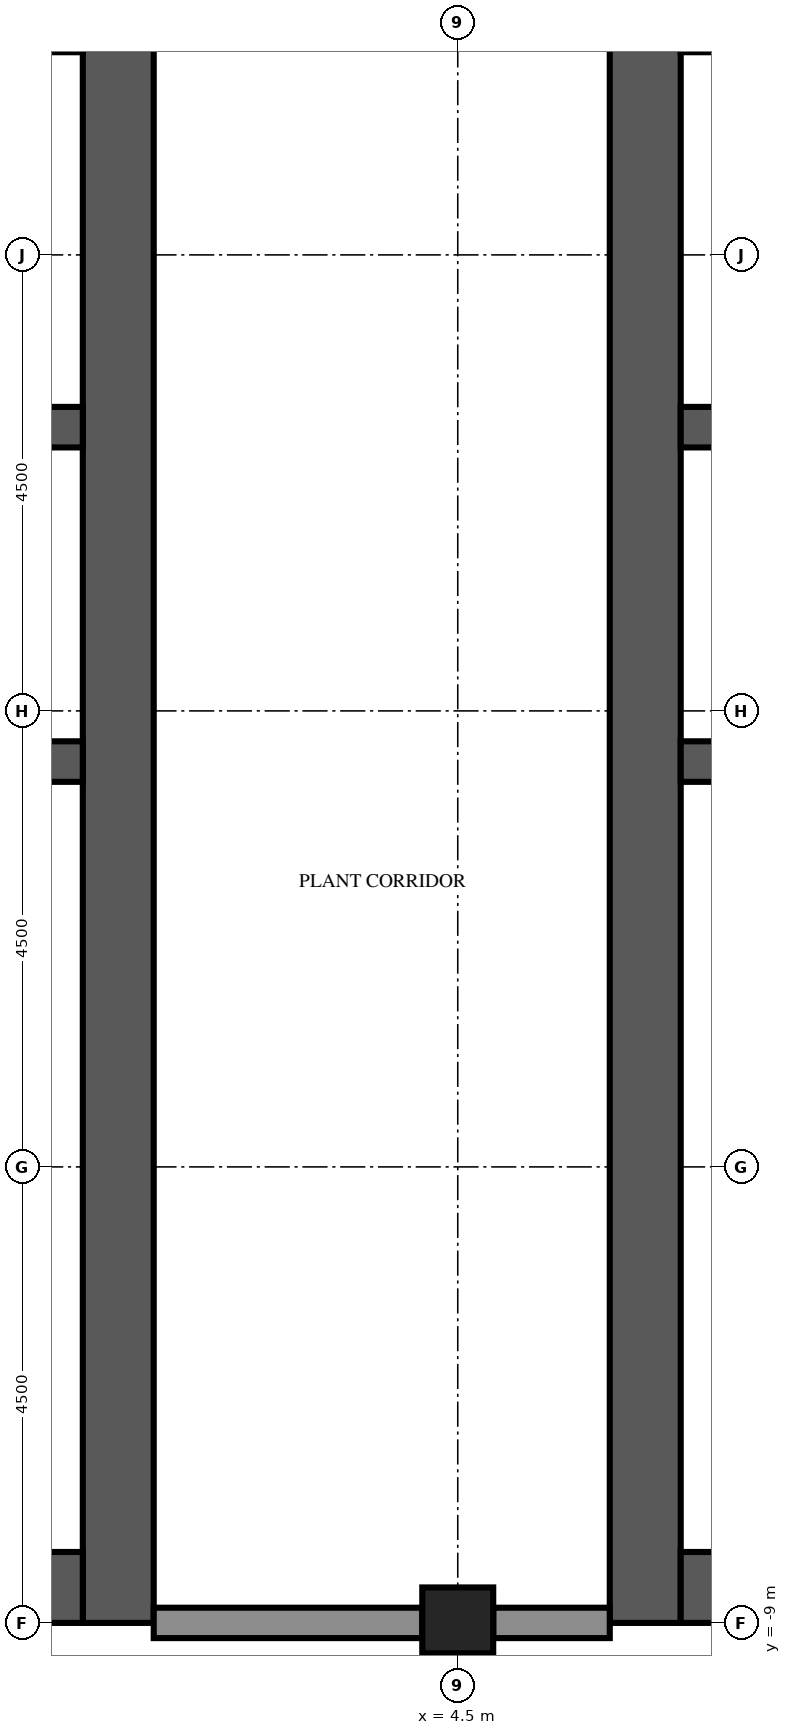
"""IFC4 building model, lengths in metres.
Left out: names, types, materials, properties, quantities, classifications, styles, units other than length and angle.
Written with IfcOpenShell. Run it as: python <this file> out.ifc"""

import sys

from ifc_helpers import new_model, si_unit, direction, frame, frame_2d, origin, origin_2d, place, context, subcontext, project, spatial, rectangle, extrude, element, fill, save


model = new_model("IFC4")
c1 = context("Model", 3, precision=1e-05, world=origin(), true_north=direction((0.0, 1.0)))
c2 = subcontext(c1, "Body", "Model", "MODEL_VIEW")
j1 = project(units=[si_unit("LENGTHUNIT", "METRE"), si_unit("PLANEANGLEUNIT", "RADIAN")], contexts=[c1])
p1 = place(None, origin())
s1 = spatial("IfcSite", under=j1, at=p1, CompositionType="ELEMENT")
p2 = place(p1, origin())
s2 = spatial("IfcBuilding", under=s1, at=p2, CompositionType="ELEMENT")
p3 = place(p2, frame((0.0, 0.0, 321.4)))
s3 = spatial("IfcBuildingStorey", under=s2, at=p3, CompositionType="ELEMENT", Elevation=321.4)
p4 = place(p3, frame((4.5, -9.0, 0.0), z_axis=(0.0, 0.0, 1.0), x_axis=(1.0, 0.0, 0.0)))
e1 = element("IfcColumn", 1, at=p4, inside=s3, PredefinedType="COLUMN", context=c2, shape_type="SweptSolid", body=[
    extrude(rectangle(XDim=0.7, YDim=0.7, at=origin_2d()), origin(), (0.0, 0.0, 1.0), 4.8),
])
p5 = place(p3, frame((1.15, -9.0, 0.0), z_axis=(0.0, 0.0, 1.0), x_axis=(0.0, 1.0, 0.0)))
e2 = element("IfcWall", 2, at=p5, inside=s3, PredefinedType="SHEAR", context=c2, shape_type="SweptSolid", body=[
    extrude(rectangle(XDim=27.5, YDim=0.7, at=frame_2d((13.75, 0.0))), origin(), (0.0, 0.0, 1.0), 4.8),
])
p6 = place(p5, frame((12.55, 0.0, 0.0)))
e3 = element("IfcOpeningElement", 3, at=p6, cuts=e2, PredefinedType="OPENING", context=c2, shape_type="SweptSolid", body=[
    extrude(rectangle(XDim=2.4, YDim=2.4, at=frame_2d((1.2, 1.2))), frame((0.0, 0.36, 0.0), z_axis=(0.0, -1.0, 0.0), x_axis=(1.0, 0.0, 0.0)), (0.0, 0.0, 1.0), 0.72),
])
p7 = place(p5, frame((5.42, 0.0, 0.0)))
e4 = element("IfcOpeningElement", 4, at=p7, cuts=e2, PredefinedType="OPENING", context=c2, shape_type="SweptSolid", body=[
    extrude(rectangle(XDim=1.2, YDim=2.1, at=frame_2d((0.6, 1.05))), frame((0.0, 0.36, 0.0), z_axis=(0.0, -1.0, 0.0), x_axis=(1.0, 0.0, 0.0)), (0.0, 0.0, 1.0), 0.72),
])
p8 = place(p5, frame((19.46, 0.0, 0.0)))
e5 = element("IfcOpeningElement", 5, at=p8, cuts=e2, PredefinedType="OPENING", context=c2, shape_type="SweptSolid", body=[
    extrude(rectangle(XDim=1.0, YDim=2.1, at=frame_2d((0.5, 1.05))), frame((0.0, 0.36, 0.0), z_axis=(0.0, -1.0, 0.0), x_axis=(1.0, 0.0, 0.0)), (0.0, 0.0, 1.0), 0.72),
])
p9 = place(p5, frame((21.17, 0.0, 0.0)))
e6 = element("IfcOpeningElement", 6, at=p9, cuts=e2, PredefinedType="OPENING", context=c2, shape_type="SweptSolid", body=[
    extrude(rectangle(XDim=1.0, YDim=2.1, at=frame_2d((0.5, 1.05))), frame((0.0, 0.36, 0.0), z_axis=(0.0, -1.0, 0.0), x_axis=(1.0, 0.0, 0.0)), (0.0, 0.0, 1.0), 0.72),
])
p10 = place(p5, frame((23.26, 0.0, 0.0)))
e7 = element("IfcOpeningElement", 7, at=p10, cuts=e2, PredefinedType="OPENING", context=c2, shape_type="SweptSolid", body=[
    extrude(rectangle(XDim=1.0, YDim=2.1, at=frame_2d((0.5, 1.05))), frame((0.0, 0.36, 0.0), z_axis=(0.0, -1.0, 0.0), x_axis=(1.0, 0.0, 0.0)), (0.0, 0.0, 1.0), 0.72),
])
p11 = place(p5, frame((25.35, 0.0, 0.0)))
e8 = element("IfcOpeningElement", 8, at=p11, cuts=e2, PredefinedType="OPENING", context=c2, shape_type="SweptSolid", body=[
    extrude(rectangle(XDim=1.0, YDim=2.1, at=frame_2d((0.5, 1.05))), frame((0.0, 0.36, 0.0), z_axis=(0.0, -1.0, 0.0), x_axis=(1.0, 0.0, 0.0)), (0.0, 0.0, 1.0), 0.72),
])
p12 = place(p3, frame((-9.8, -8.65, 0.0), z_axis=(0.0, 0.0, 1.0), x_axis=(1.0, 0.0, 0.0)))
e9 = element("IfcWall", 9, at=p12, inside=s3, PredefinedType="SHEAR", context=c2, shape_type="SweptSolid", body=[
    extrude(rectangle(XDim=10.6, YDim=0.7, at=frame_2d((5.3, 0.0))), origin(), (0.0, 0.0, 1.0), 4.8),
])
p13 = place(p3, frame((-9.8, -0.5, 0.0), z_axis=(0.0, 0.0, 1.0), x_axis=(1.0, 0.0, 0.0)))
e10 = element("IfcWall", 10, at=p13, inside=s3, PredefinedType="SHEAR", context=c2, shape_type="SweptSolid", body=[
    extrude(rectangle(XDim=10.6, YDim=0.4, at=frame_2d((5.3, 0.0))), origin(), (0.0, 0.0, 1.0), 4.8),
])
p14 = place(p3, frame((-9.8, 2.8, 0.0), z_axis=(0.0, 0.0, 1.0), x_axis=(1.0, 0.0, 0.0)))
e11 = element("IfcWall", 11, at=p14, inside=s3, PredefinedType="SHEAR", context=c2, shape_type="SweptSolid", body=[
    extrude(rectangle(XDim=10.6, YDim=0.4, at=frame_2d((5.3, 0.0))), origin(), (0.0, 0.0, 1.0), 4.8),
])
p15 = place(p14, frame((0.688, 0.0, 0.0)))
e12 = element("IfcOpeningElement", 12, at=p15, cuts=e11, PredefinedType="OPENING", context=c2, shape_type="SweptSolid", body=[
    extrude(rectangle(XDim=1.1, YDim=2.1, at=frame_2d((0.55, 1.05))), frame((0.0, 0.21, 0.0), z_axis=(0.0, -1.0, 0.0), x_axis=(1.0, 0.0, 0.0)), (0.0, 0.0, 1.0), 0.42),
])
p16 = place(p14, frame((3.438, 0.0, 0.0)))
e13 = element("IfcOpeningElement", 13, at=p16, cuts=e11, PredefinedType="OPENING", context=c2, shape_type="SweptSolid", body=[
    extrude(rectangle(XDim=1.1, YDim=2.1, at=frame_2d((0.55, 1.05))), frame((0.0, 0.21, 0.0), z_axis=(0.0, -1.0, 0.0), x_axis=(1.0, 0.0, 0.0)), (0.0, 0.0, 1.0), 0.42),
])
p17 = place(p14, frame((6.113, 0.0, 0.0)))
e14 = element("IfcOpeningElement", 14, at=p17, cuts=e11, PredefinedType="OPENING", context=c2, shape_type="SweptSolid", body=[
    extrude(rectangle(XDim=1.0, YDim=2.1, at=frame_2d((0.5, 1.05))), frame((0.0, 0.21, 0.0), z_axis=(0.0, -1.0, 0.0), x_axis=(1.0, 0.0, 0.0)), (0.0, 0.0, 1.0), 0.42),
])
p18 = place(p14, frame((8.863, 0.0, 0.0)))
e15 = element("IfcOpeningElement", 15, at=p18, cuts=e11, PredefinedType="OPENING", context=c2, shape_type="SweptSolid", body=[
    extrude(rectangle(XDim=1.0, YDim=2.1, at=frame_2d((0.5, 1.05))), frame((0.0, 0.21, 0.0), z_axis=(0.0, -1.0, 0.0), x_axis=(1.0, 0.0, 0.0)), (0.0, 0.0, 1.0), 0.42),
])
p19 = place(p3, frame((6.35, -9.0, 0.0), z_axis=(0.0, 0.0, 1.0), x_axis=(0.0, 1.0, 0.0)))
e16 = element("IfcWall", 16, at=p19, inside=s3, PredefinedType="SHEAR", context=c2, shape_type="SweptSolid", body=[
    extrude(rectangle(XDim=27.5, YDim=0.7, at=frame_2d((13.75, 0.0))), origin(), (0.0, 0.0, 1.0), 4.8),
])
p20 = place(p19, frame((12.55, 0.0, 0.0)))
e17 = element("IfcOpeningElement", 17, at=p20, cuts=e16, PredefinedType="OPENING", context=c2, shape_type="SweptSolid", body=[
    extrude(rectangle(XDim=2.4, YDim=2.4, at=frame_2d((1.2, 1.2))), frame((0.0, 0.36, 0.0), z_axis=(0.0, -1.0, 0.0), x_axis=(1.0, 0.0, 0.0)), (0.0, 0.0, 1.0), 0.72),
])
p21 = place(p19, frame((3.9, 0.0, 0.0)))
e18 = element("IfcOpeningElement", 18, at=p21, cuts=e16, PredefinedType="OPENING", context=c2, shape_type="SweptSolid", body=[
    extrude(rectangle(XDim=1.2, YDim=2.1, at=frame_2d((0.6, 1.05))), frame((0.0, 0.36, 0.0), z_axis=(0.0, -1.0, 0.0), x_axis=(1.0, 0.0, 0.0)), (0.0, 0.0, 1.0), 0.72),
])
p22 = place(p19, frame((22.4, 0.0, 0.0)))
e19 = element("IfcOpeningElement", 19, at=p22, cuts=e16, PredefinedType="OPENING", context=c2, shape_type="SweptSolid", body=[
    extrude(rectangle(XDim=1.2, YDim=2.1, at=frame_2d((0.6, 1.05))), frame((0.0, 0.36, 0.0), z_axis=(0.0, -1.0, 0.0), x_axis=(1.0, 0.0, 0.0)), (0.0, 0.0, 1.0), 0.72),
])
p23 = place(p3, frame((6.7, -8.65, 0.0), z_axis=(0.0, 0.0, 1.0), x_axis=(1.0, 0.0, 0.0)))
e20 = element("IfcWall", 20, at=p23, inside=s3, PredefinedType="SHEAR", context=c2, shape_type="SweptSolid", body=[
    extrude(rectangle(XDim=10.6, YDim=0.7, at=frame_2d((5.3, 0.0))), origin(), (0.0, 0.0, 1.0), 4.8),
])
p24 = place(p3, frame((6.7, -0.5, 0.0), z_axis=(0.0, 0.0, 1.0), x_axis=(1.0, 0.0, 0.0)))
e21 = element("IfcWall", 21, at=p24, inside=s3, PredefinedType="SHEAR", context=c2, shape_type="SweptSolid", body=[
    extrude(rectangle(XDim=10.6, YDim=0.4, at=frame_2d((5.3, 0.0))), origin(), (0.0, 0.0, 1.0), 4.8),
])
p25 = place(p3, frame((6.7, 2.8, 0.0), z_axis=(0.0, 0.0, 1.0), x_axis=(1.0, 0.0, 0.0)))
e22 = element("IfcWall", 22, at=p25, inside=s3, PredefinedType="SHEAR", context=c2, shape_type="SweptSolid", body=[
    extrude(rectangle(XDim=10.6, YDim=0.4, at=frame_2d((5.3, 0.0))), origin(), (0.0, 0.0, 1.0), 4.8),
])
p26 = place(p25, frame((0.688, 0.0, 0.0)))
e23 = element("IfcOpeningElement", 23, at=p26, cuts=e22, PredefinedType="OPENING", context=c2, shape_type="SweptSolid", body=[
    extrude(rectangle(XDim=1.1, YDim=2.1, at=frame_2d((0.55, 1.05))), frame((0.0, 0.21, 0.0), z_axis=(0.0, -1.0, 0.0), x_axis=(1.0, 0.0, 0.0)), (0.0, 0.0, 1.0), 0.42),
])
p27 = place(p25, frame((3.438, 0.0, 0.0)))
e24 = element("IfcOpeningElement", 24, at=p27, cuts=e22, PredefinedType="OPENING", context=c2, shape_type="SweptSolid", body=[
    extrude(rectangle(XDim=1.1, YDim=2.1, at=frame_2d((0.55, 1.05))), frame((0.0, 0.21, 0.0), z_axis=(0.0, -1.0, 0.0), x_axis=(1.0, 0.0, 0.0)), (0.0, 0.0, 1.0), 0.42),
])
p28 = place(p25, frame((6.113, 0.0, 0.0)))
e25 = element("IfcOpeningElement", 25, at=p28, cuts=e22, PredefinedType="OPENING", context=c2, shape_type="SweptSolid", body=[
    extrude(rectangle(XDim=1.0, YDim=2.1, at=frame_2d((0.5, 1.05))), frame((0.0, 0.21, 0.0), z_axis=(0.0, -1.0, 0.0), x_axis=(1.0, 0.0, 0.0)), (0.0, 0.0, 1.0), 0.42),
])
p29 = place(p25, frame((8.863, 0.0, 0.0)))
e26 = element("IfcOpeningElement", 26, at=p29, cuts=e22, PredefinedType="OPENING", context=c2, shape_type="SweptSolid", body=[
    extrude(rectangle(XDim=1.0, YDim=2.1, at=frame_2d((0.5, 1.05))), frame((0.0, 0.21, 0.0), z_axis=(0.0, -1.0, 0.0), x_axis=(1.0, 0.0, 0.0)), (0.0, 0.0, 1.0), 0.42),
])
p30 = place(p3, frame((1.5, -9.0, 0.0), z_axis=(0.0, 0.0, 1.0), x_axis=(1.0, 0.0, 0.0)))
e27 = element("IfcWall", 27, at=p30, inside=s3, PredefinedType="SOLIDWALL", context=c2, shape_type="SweptSolid", body=[
    extrude(rectangle(XDim=2.65, YDim=0.3, at=frame_2d((1.325, 0.0))), origin(), (0.0, 0.0, 1.0), 0.85),
])
p31 = place(p3, frame((4.85, -9.0, 0.0), z_axis=(0.0, 0.0, 1.0), x_axis=(1.0, 0.0, 0.0)))
e28 = element("IfcWall", 28, at=p31, inside=s3, PredefinedType="SOLIDWALL", context=c2, shape_type="SweptSolid", body=[
    extrude(rectangle(XDim=1.15, YDim=0.3, at=frame_2d((0.575, 0.0))), origin(), (0.0, 0.0, 1.0), 0.85),
])
p32 = place(p3, frame((-0.7, -5.26, 0.0), z_axis=(0.0, 0.0, 1.0), x_axis=(1.0, 0.0, 0.0)))
e29 = element("IfcWall", 29, at=p32, inside=s3, PredefinedType="PARTITIONING", context=c2, shape_type="SweptSolid", body=[
    extrude(rectangle(XDim=1.5, YDim=0.1, at=frame_2d((0.75, 0.0))), origin(), (0.0, 0.0, 1.0), 4.2),
])
p33 = place(p32, frame((0.25, 0.0, 0.0)))
e30 = element("IfcOpeningElement", 30, at=p33, cuts=e29, PredefinedType="OPENING", context=c2, shape_type="SweptSolid", body=[
    extrude(rectangle(XDim=1.0, YDim=2.1, at=frame_2d((0.5, 1.05))), frame((0.0, 0.06, 0.0), z_axis=(0.0, -1.0, 0.0), x_axis=(1.0, 0.0, 0.0)), (0.0, 0.0, 1.0), 0.12),
])
p34 = place(p6, origin())
e31 = element("IfcDoor", 31, at=p34, inside=s3, OperationType="DOUBLE_DOOR_DOUBLE_SWING", PredefinedType="DOOR", context=c2, shape_type="SweptSolid", body=[
    extrude(rectangle(XDim=2.4, YDim=2.4, at=frame_2d((1.2, 1.2))), frame((0.0, 0.025, 0.0), z_axis=(0.0, -1.0, 0.0), x_axis=(1.0, 0.0, 0.0)), (0.0, 0.0, 1.0), 0.05),
])
fill(e3, e31)
p35 = place(p20, origin())
e32 = element("IfcDoor", 32, at=p35, inside=s3, OperationType="DOUBLE_DOOR_DOUBLE_SWING", PredefinedType="DOOR", context=c2, shape_type="SweptSolid", body=[
    extrude(rectangle(XDim=2.4, YDim=2.4, at=frame_2d((1.2, 1.2))), frame((0.0, 0.025, 0.0), z_axis=(0.0, -1.0, 0.0), x_axis=(1.0, 0.0, 0.0)), (0.0, 0.0, 1.0), 0.05),
])
fill(e17, e32)
p36 = place(p7, origin())
e33 = element("IfcDoor", 33, at=p36, inside=s3, OperationType="SINGLE_SWING_LEFT", PredefinedType="DOOR", context=c2, shape_type="SweptSolid", body=[
    extrude(rectangle(XDim=1.2, YDim=2.1, at=frame_2d((0.6, 1.05))), frame((0.0, 0.325, 0.0), z_axis=(0.0, -1.0, 0.0), x_axis=(1.0, 0.0, 0.0)), (0.0, 0.0, 1.0), 0.05),
])
fill(e4, e33)
p37 = place(p33, origin())
e34 = element("IfcDoor", 34, at=p37, inside=s3, OperationType="SINGLE_SWING_RIGHT", PredefinedType="DOOR", context=c2, shape_type="SweptSolid", body=[
    extrude(rectangle(XDim=1.0, YDim=2.1, at=frame_2d((0.5, 1.05))), frame((0.0, 0.025, 0.0), z_axis=(0.0, -1.0, 0.0), x_axis=(1.0, 0.0, 0.0)), (0.0, 0.0, 1.0), 0.05),
])
fill(e30, e34)
p38 = place(p21, origin())
e35 = element("IfcDoor", 35, at=p38, inside=s3, OperationType="SINGLE_SWING_RIGHT", PredefinedType="DOOR", context=c2, shape_type="SweptSolid", body=[
    extrude(rectangle(XDim=1.2, YDim=2.1, at=frame_2d((0.6, 1.05))), frame((0.0, -0.275, 0.0), z_axis=(0.0, -1.0, 0.0), x_axis=(1.0, 0.0, 0.0)), (0.0, 0.0, 1.0), 0.05),
])
fill(e18, e35)
save(model, sys.argv[1])
